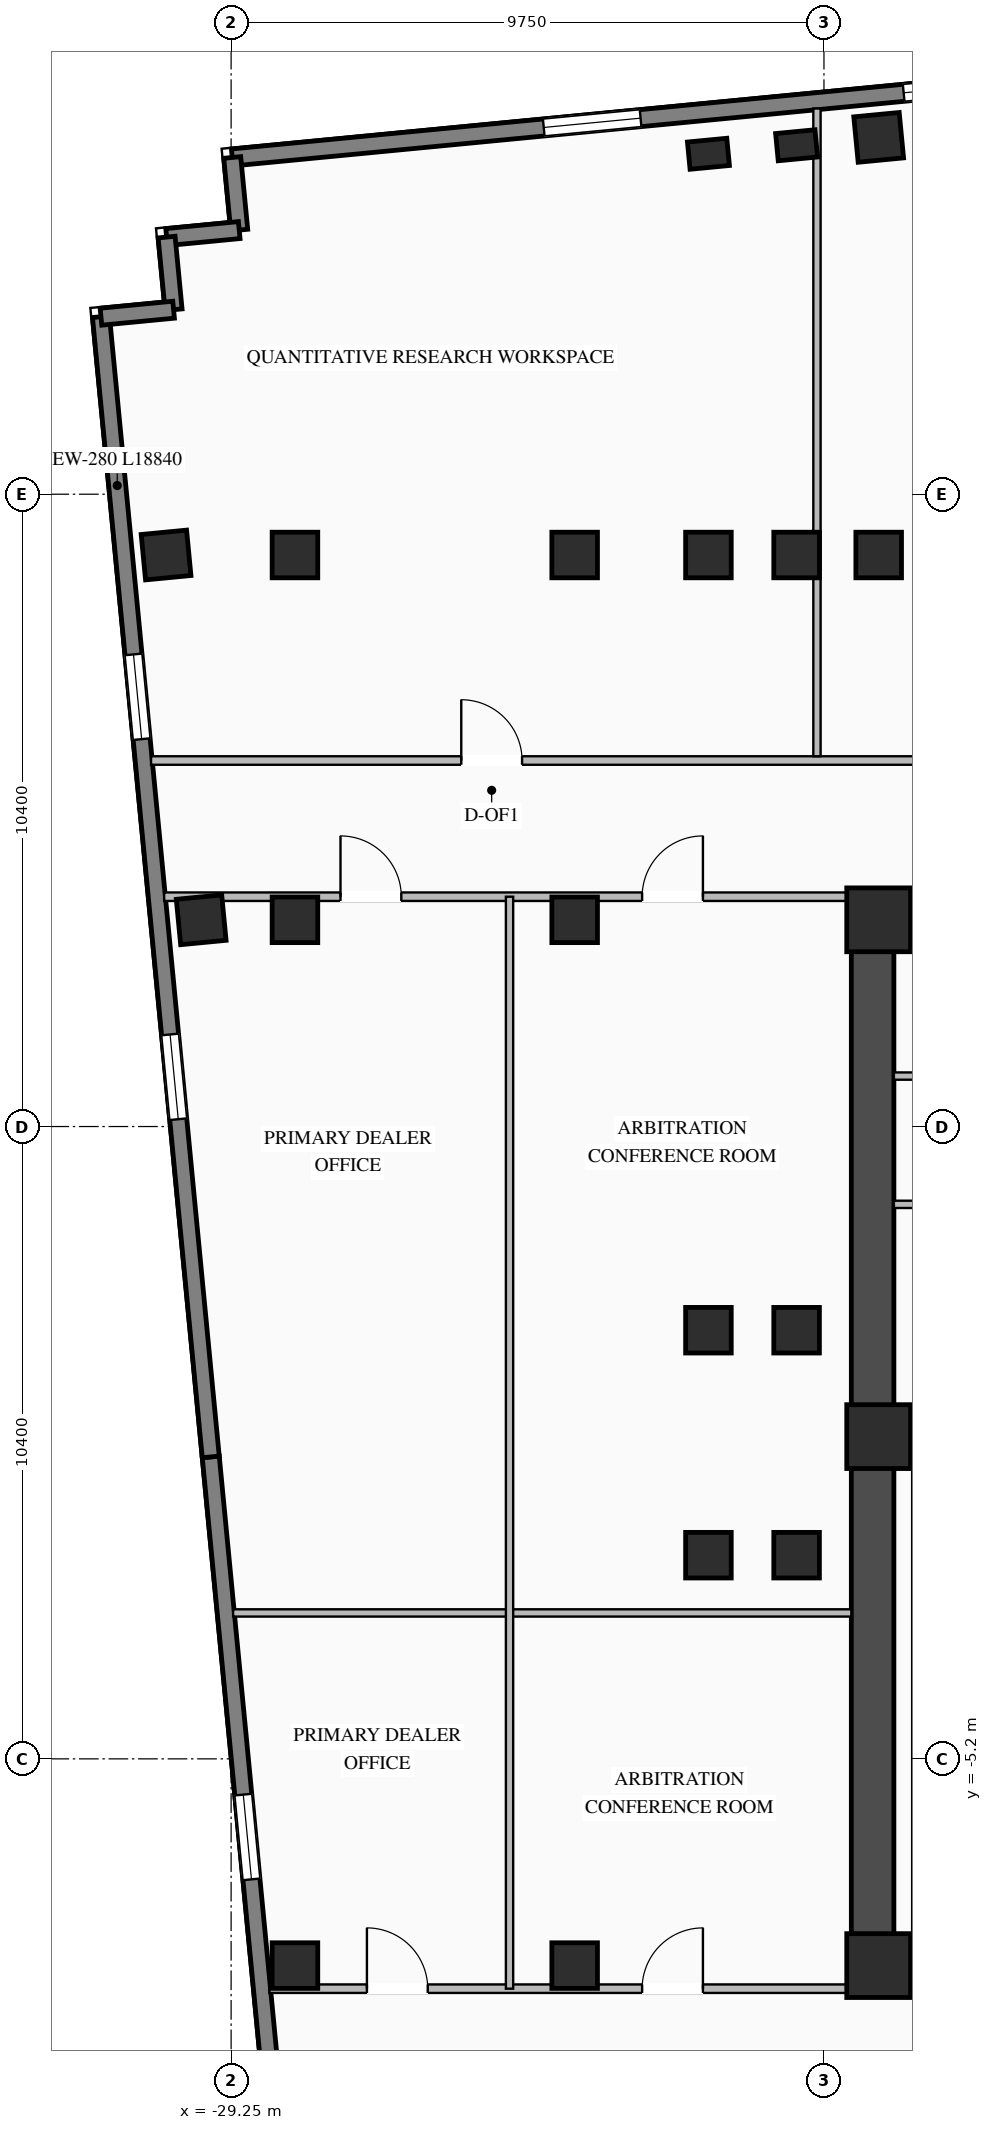
"""IFC4 building model, lengths in metres.
Left out: names, types, materials, properties, quantities, classifications, styles, units other than length and angle.
Written with IfcOpenShell. Run it as: python <this file> out.ifc"""

import sys

from ifc_helpers import new_model, si_unit, direction, frame, frame_2d, origin, origin_2d, place, context, subcontext, project, spatial, rectangle, i_section, extrude, element, fill, save


model = new_model("IFC4")
c1 = context("Model", 3, precision=1e-05, world=origin(), true_north=direction((0.0, 1.0)))
c2 = subcontext(c1, "Body", "Model", "MODEL_VIEW")
j1 = project(units=[si_unit("LENGTHUNIT", "METRE"), si_unit("PLANEANGLEUNIT", "RADIAN")], contexts=[c1])
p1 = place(None, origin())
s1 = spatial("IfcSite", under=j1, at=p1, CompositionType="ELEMENT")
p2 = place(p1, origin())
s2 = spatial("IfcBuilding", under=s1, at=p2, CompositionType="ELEMENT")
p3 = place(p2, frame((0.0, 0.0, 84.55)))
s3 = spatial("IfcBuildingStorey", under=s2, at=p3, CompositionType="ELEMENT", Elevation=84.55)
p4 = place(p3, frame((-19.05, -8.7, 0.0), z_axis=(0.0, 0.0, 1.0), x_axis=(1.0, 0.0, 0.0)))
e1 = element("IfcWall", 1, at=p4, inside=s3, PredefinedType="SHEAR", context=c2, shape_type="SweptSolid", body=[
    extrude(rectangle(XDim=10.25, YDim=0.7, at=frame_2d((5.125, 0.0))), origin(), (0.0, 0.0, 1.0), 3.27),
])
p5 = place(p3, frame((-19.05, 8.7, 0.0), z_axis=(0.0, 0.0, 1.0), x_axis=(1.0, 0.0, 0.0)))
e2 = element("IfcWall", 2, at=p5, inside=s3, PredefinedType="SHEAR", context=c2, shape_type="SweptSolid", body=[
    extrude(rectangle(XDim=10.25, YDim=0.7, at=frame_2d((5.125, 0.0))), origin(), (0.0, 0.0, 1.0), 3.27),
])
p6 = place(p5, frame((5.6, 0.0, 0.0)))
e3 = element("IfcOpeningElement", 3, at=p6, cuts=e2, PredefinedType="OPENING", context=c2, shape_type="SweptSolid", body=[
    extrude(rectangle(XDim=1.4, YDim=2.05, at=frame_2d((0.7, 1.025))), frame((0.0, 0.36, 0.0), z_axis=(0.0, -1.0, 0.0), x_axis=(1.0, 0.0, 0.0)), (0.0, 0.0, 1.0), 0.72),
])
p7 = place(p3, frame((-18.7, -8.35, 0.0), z_axis=(0.0, 0.0, 1.0), x_axis=(0.0, 1.0, 0.0)))
e4 = element("IfcWall", 4, at=p7, inside=s3, PredefinedType="SHEAR", context=c2, shape_type="SweptSolid", body=[
    extrude(rectangle(XDim=16.7, YDim=0.7, at=frame_2d((8.35, 0.0))), origin(), (0.0, 0.0, 1.0), 3.27),
])
for number, where, z_axis, x_axis in (
    (5, (-18.6, -8.6, 0.0), (0.0, 0.0, 1.0), (1.0, 0.0, 0.0)),
    (6, (-18.6, 0.1, 0.0), (0.0, 0.0, 1.0), (1.0, 0.0, 0.0)),
    (7, (-18.6, 8.6, 0.0), (0.0, 0.0, 1.0), (1.0, 0.0, 0.0)),
):
    element("IfcColumn", number, at=place(p3, frame(where, z_axis=z_axis, x_axis=x_axis)), inside=s3, PredefinedType="COLUMN", context=c2, shape_type="SweptSolid", body=[
        extrude(rectangle(XDim=1.05, YDim=1.05, at=origin_2d()), origin(), (0.0, 0.0, 1.0), 3.45),
    ])
for number, where, z_axis, x_axis in (
    (8, (-21.4, 14.6, 0.0), (0.0, 0.0, 1.0), (1.0, 0.0, 0.0)),
    (9, (-19.95, 14.6, 0.0), (0.0, 0.0, 1.0), (1.0, 0.0, 0.0)),
    (10, (-18.6, 14.6, 0.0), (0.0, 0.0, 1.0), (1.0, 0.0, 0.0)),
    (11, (-21.4, -1.85, 0.0), (0.0, 0.0, 1.0), (1.0, 0.0, 0.0)),
    (12, (-21.4, 1.85, 0.0), (0.0, 0.0, 1.0), (1.0, 0.0, 0.0)),
    (13, (-19.95, -1.85, 0.0), (0.0, 0.0, 1.0), (1.0, 0.0, 0.0)),
    (14, (-19.95, 1.85, 0.0), (0.0, 0.0, 1.0), (1.0, 0.0, 0.0)),
    (15, (-23.6, -8.6, 0.0), (0.0, 0.0, 1.0), (1.0, 0.0, 0.0)),
    (16, (-23.6, 8.6, 0.0), (0.0, 0.0, 1.0), (1.0, 0.0, 0.0)),
    (17, (-23.6, 14.6, 0.0), (0.0, 0.0, 1.0), (1.0, 0.0, 0.0)),
    (18, (-28.2, -8.6, 0.0), (0.0, 0.0, 1.0), (1.0, 0.0, 0.0)),
    (19, (-28.2, 8.6, 0.0), (0.0, 0.0, 1.0), (1.0, 0.0, 0.0)),
    (20, (-28.2, 14.6, 0.0), (0.0, 0.0, 1.0), (1.0, 0.0, 0.0)),
    (21, (-18.6, 21.469, 0.0), (0.0, 0.0, 1.0), (0.995, 0.096, 0.0)),
    (22, (-29.742, 8.6, 0.0), (0.0, 0.0, 1.0), (0.995, 0.096, 0.0)),
    (23, (-30.32, 14.6, 0.0), (0.0, 0.0, 1.0), (0.995, 0.096, 0.0)),
):
    element("IfcColumn", number, at=place(p3, frame(where, z_axis=z_axis, x_axis=x_axis)), inside=s3, PredefinedType="COLUMN", context=c2, shape_type="SweptSolid", body=[
        extrude(i_section(OverallWidth=0.75, OverallDepth=0.75, WebThickness=0.03, FlangeThickness=0.044, at=origin_2d()), origin(), (0.0, 0.0, 1.0), 3.45),
    ])
for number, where, z_axis, x_axis in (
    (24, (-21.4, 21.199, 0.0), (0.0, 0.0, 1.0), (0.995, 0.096, 0.0)),
    (25, (-19.95, 21.339, 0.0), (0.0, 0.0, 1.0), (0.995, 0.096, 0.0)),
):
    element("IfcColumn", number, at=place(p3, frame(where, z_axis=z_axis, x_axis=x_axis)), inside=s3, PredefinedType="PILASTER", context=c2, shape_type="SweptSolid", body=[
        extrude(rectangle(XDim=0.65, YDim=0.45, at=origin_2d()), origin(), (0.0, 0.0, 1.0), 3.45),
    ])
p8 = place(p3, frame((-29.231, 21.138, 0.0), z_axis=(0.0, 0.0, 1.0), x_axis=(0.995395780835, 0.095850088663, 0.0)))
e26 = element("IfcWall", 26, at=p8, inside=s3, PredefinedType="STANDARD", context=c2, shape_type="SweptSolid", body=[
    extrude(rectangle(XDim=17.84, YDim=0.28, at=frame_2d((8.92, 0.0))), origin(), (0.0, 0.0, 1.0), 3.25),
])
p9 = place(p8, frame((5.147, 0.0, 0.76)))
e27 = element("IfcOpeningElement", 27, at=p9, cuts=e26, PredefinedType="OPENING", context=c2, shape_type="SweptSolid", body=[
    extrude(rectangle(XDim=1.6, YDim=1.95, at=frame_2d((0.8, 0.975))), frame((0.0, 0.15, 0.0), z_axis=(0.0, -1.0, 0.0), x_axis=(1.0, 0.0, 0.0)), (0.0, 0.0, 1.0), 0.3),
])
p10 = place(p8, frame((11.093, 0.0, 0.76)))
e28 = element("IfcOpeningElement", 28, at=p10, cuts=e26, PredefinedType="OPENING", context=c2, shape_type="SweptSolid", body=[
    extrude(rectangle(XDim=1.6, YDim=1.95, at=frame_2d((0.8, 0.975))), frame((0.0, 0.15, 0.0), z_axis=(0.0, -1.0, 0.0), x_axis=(1.0, 0.0, 0.0)), (0.0, 0.0, 1.0), 0.3),
])
p11 = place(p3, frame((-27.779, -18.987, 0.0), z_axis=(0.0, 0.0, 1.0), x_axis=(-0.095842534142, 0.995396508256, 0.0)))
e29 = element("IfcWall", 29, at=p11, inside=s3, PredefinedType="STANDARD", context=c2, shape_type="SweptSolid", body=[
    extrude(rectangle(XDim=18.84, YDim=0.28, at=frame_2d((9.42, 0.0))), origin(), (0.0, 0.0, 1.0), 3.25),
])
p12 = place(p11, frame((5.58, 0.0, 0.76)))
e30 = element("IfcOpeningElement", 30, at=p12, cuts=e29, PredefinedType="OPENING", context=c2, shape_type="SweptSolid", body=[
    extrude(rectangle(XDim=1.4, YDim=1.95, at=frame_2d((0.7, 0.975))), frame((0.0, 0.15, 0.0), z_axis=(0.0, -1.0, 0.0), x_axis=(1.0, 0.0, 0.0)), (0.0, 0.0, 1.0), 0.3),
])
p13 = place(p11, frame((11.86, 0.0, 0.76)))
e31 = element("IfcOpeningElement", 31, at=p13, cuts=e29, PredefinedType="OPENING", context=c2, shape_type="SweptSolid", body=[
    extrude(rectangle(XDim=1.4, YDim=1.95, at=frame_2d((0.7, 0.975))), frame((0.0, 0.15, 0.0), z_axis=(0.0, -1.0, 0.0), x_axis=(1.0, 0.0, 0.0)), (0.0, 0.0, 1.0), 0.3),
])
p14 = place(p3, frame((-29.585, -0.234, 0.0), z_axis=(0.0, 0.0, 1.0), x_axis=(-0.095841297881, 0.99539662729, 0.0)))
e32 = element("IfcWall", 32, at=p14, inside=s3, PredefinedType="STANDARD", context=c2, shape_type="SweptSolid", body=[
    extrude(rectangle(XDim=18.84, YDim=0.28, at=frame_2d((9.42, 0.0))), origin(), (0.0, 0.0, 1.0), 3.25),
])
p15 = place(p14, frame((5.58, 0.0, 0.76)))
e33 = element("IfcOpeningElement", 33, at=p15, cuts=e32, PredefinedType="OPENING", context=c2, shape_type="SweptSolid", body=[
    extrude(rectangle(XDim=1.4, YDim=1.95, at=frame_2d((0.7, 0.975))), frame((0.0, 0.15, 0.0), z_axis=(0.0, -1.0, 0.0), x_axis=(1.0, 0.0, 0.0)), (0.0, 0.0, 1.0), 0.3),
])
p16 = place(p14, frame((11.86, 0.0, 0.76)))
e34 = element("IfcOpeningElement", 34, at=p16, cuts=e32, PredefinedType="OPENING", context=c2, shape_type="SweptSolid", body=[
    extrude(rectangle(XDim=1.4, YDim=1.95, at=frame_2d((0.7, 0.975))), frame((0.0, 0.15, 0.0), z_axis=(0.0, -1.0, 0.0), x_axis=(1.0, 0.0, 0.0)), (0.0, 0.0, 1.0), 0.3),
])
for number, where, z_axis, x_axis in (
    (35, (-29.231, 21.138, 0.0), (0.0, 0.0, 1.0), (0.096, -0.995, 0.0)),
    (36, (-29.116, 19.944, 0.0), (0.0, 0.0, 1.0), (-0.995, -0.096, 0.0)),
):
    element("IfcWall", number, at=place(p3, frame(where, z_axis=z_axis, x_axis=x_axis)), inside=s3, PredefinedType="STANDARD", context=c2, shape_type="SweptSolid", body=[
        extrude(rectangle(XDim=1.2, YDim=0.28, at=frame_2d((0.6, 0.0))), origin(), (0.0, 0.0, 1.0), 3.25),
    ])
for number, where, z_axis, x_axis in (
    (37, (-30.311, 19.829, 0.0), (0.0, 0.0, 1.0), (0.096, -0.995, 0.0)),
    (38, (-30.196, 18.635, 0.0), (0.0, 0.0, 1.0), (-0.995, -0.096, 0.0)),
):
    element("IfcWall", number, at=place(p3, frame(where, z_axis=z_axis, x_axis=x_axis)), inside=s3, PredefinedType="STANDARD", context=c2, shape_type="SweptSolid", body=[
        extrude(rectangle(XDim=1.2, YDim=0.28, at=frame_2d((0.6, 0.0))), origin(), (0.0, 0.0, 1.0), 3.25),
    ])
p17 = place(p3, frame((-18.35, 3.92, 0.0), z_axis=(0.0, 0.0, 1.0), x_axis=(1.0, 0.0, 0.0)))
e39 = element("IfcWall", 39, at=p17, inside=s3, PredefinedType="STANDARD", context=c2, shape_type="SweptSolid", body=[
    extrude(rectangle(XDim=4.45, YDim=0.12, at=frame_2d((2.225, 0.0))), origin(), (0.0, 0.0, 1.0), 3.25),
])
p18 = place(p3, frame((-18.35, 6.03, 0.0), z_axis=(0.0, 0.0, 1.0), x_axis=(1.0, 0.0, 0.0)))
e40 = element("IfcWall", 40, at=p18, inside=s3, PredefinedType="STANDARD", context=c2, shape_type="SweptSolid", body=[
    extrude(rectangle(XDim=2.2, YDim=0.12, at=frame_2d((1.1, 0.0))), origin(), (0.0, 0.0, 1.0), 3.25),
])
p19 = place(p3, frame((-30.567, 11.22, 0.0), z_axis=(0.0, 0.0, 1.0), x_axis=(1.0, 0.0, 0.0)))
e41 = element("IfcWall", 41, at=p19, inside=s3, PredefinedType="STANDARD", context=c2, shape_type="SweptSolid", body=[
    extrude(rectangle(XDim=67.551, YDim=0.14, at=frame_2d((33.775, 0.0))), origin(), (0.0, 0.0, 1.0), 3.25),
])
p20 = place(p19, frame((5.102, 0.0, 0.0)))
e42 = element("IfcOpeningElement", 42, at=p20, cuts=e41, PredefinedType="OPENING", context=c2, shape_type="SweptSolid", body=[
    extrude(rectangle(XDim=1.0, YDim=2.08, at=frame_2d((0.5, 1.04))), frame((0.0, 0.08, 0.0), z_axis=(0.0, -1.0, 0.0), x_axis=(1.0, 0.0, 0.0)), (0.0, 0.0, 1.0), 0.16),
])
p21 = place(p19, frame((17.263, 0.0, 0.0)))
e43 = element("IfcOpeningElement", 43, at=p21, cuts=e41, PredefinedType="OPENING", context=c2, shape_type="SweptSolid", body=[
    extrude(rectangle(XDim=1.0, YDim=2.08, at=frame_2d((0.5, 1.04))), frame((0.0, 0.08, 0.0), z_axis=(0.0, -1.0, 0.0), x_axis=(1.0, 0.0, 0.0)), (0.0, 0.0, 1.0), 0.16),
])
p22 = place(p19, frame((31.566, 0.0, 0.0)))
e44 = element("IfcOpeningElement", 44, at=p22, cuts=e41, PredefinedType="OPENING", context=c2, shape_type="SweptSolid", body=[
    extrude(rectangle(XDim=1.0, YDim=2.08, at=frame_2d((0.5, 1.04))), frame((0.0, 0.08, 0.0), z_axis=(0.0, -1.0, 0.0), x_axis=(1.0, 0.0, 0.0)), (0.0, 0.0, 1.0), 0.16),
])
p23 = place(p19, frame((46.551, 0.0, 0.0)))
e45 = element("IfcOpeningElement", 45, at=p23, cuts=e41, PredefinedType="OPENING", context=c2, shape_type="SweptSolid", body=[
    extrude(rectangle(XDim=1.0, YDim=2.08, at=frame_2d((0.5, 1.04))), frame((0.0, 0.08, 0.0), z_axis=(0.0, -1.0, 0.0), x_axis=(1.0, 0.0, 0.0)), (0.0, 0.0, 1.0), 0.16),
])
p24 = place(p19, frame((60.421, 0.0, 0.0)))
e46 = element("IfcOpeningElement", 46, at=p24, cuts=e41, PredefinedType="OPENING", context=c2, shape_type="SweptSolid", body=[
    extrude(rectangle(XDim=1.0, YDim=2.08, at=frame_2d((0.5, 1.04))), frame((0.0, 0.08, 0.0), z_axis=(0.0, -1.0, 0.0), x_axis=(1.0, 0.0, 0.0)), (0.0, 0.0, 1.0), 0.16),
])
p25 = place(p3, frame((-19.615, 11.29, 0.0), z_axis=(0.0, 0.0, 1.0), x_axis=(0.0, 1.0, 0.0)))
e47 = element("IfcWall", 47, at=p25, inside=s3, PredefinedType="STANDARD", context=c2, shape_type="SweptSolid", body=[
    extrude(rectangle(XDim=10.654, YDim=0.12, at=frame_2d((5.327, 0.0))), origin(), (0.0, 0.0, 1.0), 3.25),
])
p26 = place(p3, frame((-30.351, 8.98, 0.0), z_axis=(0.0, 0.0, 1.0), x_axis=(1.0, 0.0, 0.0)))
e48 = element("IfcWall", 48, at=p26, inside=s3, PredefinedType="STANDARD", context=c2, shape_type="SweptSolid", body=[
    extrude(rectangle(XDim=11.301, YDim=0.14, at=frame_2d((5.651, 0.0))), origin(), (0.0, 0.0, 1.0), 3.25),
])
p27 = place(p26, frame((2.9, 0.0, 0.0)))
e49 = element("IfcOpeningElement", 49, at=p27, cuts=e48, PredefinedType="OPENING", context=c2, shape_type="SweptSolid", body=[
    extrude(rectangle(XDim=1.0, YDim=2.08, at=frame_2d((0.5, 1.04))), frame((0.0, 0.08, 0.0), z_axis=(0.0, -1.0, 0.0), x_axis=(1.0, 0.0, 0.0)), (0.0, 0.0, 1.0), 0.16),
])
p28 = place(p26, frame((7.861, 0.0, 0.0)))
e50 = element("IfcOpeningElement", 50, at=p28, cuts=e48, PredefinedType="OPENING", context=c2, shape_type="SweptSolid", body=[
    extrude(rectangle(XDim=1.0, YDim=2.08, at=frame_2d((0.5, 1.04))), frame((0.0, 0.08, 0.0), z_axis=(0.0, -1.0, 0.0), x_axis=(1.0, 0.0, 0.0)), (0.0, 0.0, 1.0), 0.16),
])
p29 = place(p3, frame((-28.622, -8.98, 0.0), z_axis=(0.0, 0.0, 1.0), x_axis=(1.0, 0.0, 0.0)))
e51 = element("IfcWall", 51, at=p29, inside=s3, PredefinedType="STANDARD", context=c2, shape_type="SweptSolid", body=[
    extrude(rectangle(XDim=9.572, YDim=0.14, at=frame_2d((4.786, 0.0))), origin(), (0.0, 0.0, 1.0), 3.25),
])
p30 = place(p29, frame((1.605, 0.0, 0.0)))
e52 = element("IfcOpeningElement", 52, at=p30, cuts=e51, PredefinedType="OPENING", context=c2, shape_type="SweptSolid", body=[
    extrude(rectangle(XDim=1.0, YDim=2.08, at=frame_2d((0.5, 1.04))), frame((0.0, 0.08, 0.0), z_axis=(0.0, -1.0, 0.0), x_axis=(1.0, 0.0, 0.0)), (0.0, 0.0, 1.0), 0.16),
])
p31 = place(p29, frame((6.132, 0.0, 0.0)))
e53 = element("IfcOpeningElement", 53, at=p31, cuts=e51, PredefinedType="OPENING", context=c2, shape_type="SweptSolid", body=[
    extrude(rectangle(XDim=1.0, YDim=2.08, at=frame_2d((0.5, 1.04))), frame((0.0, 0.08, 0.0), z_axis=(0.0, -1.0, 0.0), x_axis=(1.0, 0.0, 0.0)), (0.0, 0.0, 1.0), 0.16),
])
p32 = place(p3, frame((-29.217, -2.8, 0.0), z_axis=(0.0, 0.0, 1.0), x_axis=(1.0, 0.0, 0.0)))
e54 = element("IfcWall", 54, at=p32, inside=s3, PredefinedType="STANDARD", context=c2, shape_type="SweptSolid", body=[
    extrude(rectangle(XDim=10.167, YDim=0.12, at=frame_2d((5.083, 0.0))), origin(), (0.0, 0.0, 1.0), 3.25),
])
p33 = place(p3, frame((-24.671, -8.98, 0.0), z_axis=(0.0, 0.0, 1.0), x_axis=(0.0, 1.0, 0.0)))
e55 = element("IfcWall", 55, at=p33, inside=s3, PredefinedType="STANDARD", context=c2, shape_type="SweptSolid", body=[
    extrude(rectangle(XDim=17.96, YDim=0.12, at=frame_2d((8.98, 0.0))), origin(), (0.0, 0.0, 1.0), 3.25),
])
p34 = place(p9, origin())
e56 = element("IfcWindow", 56, at=p34, inside=s3, PartitioningType="SINGLE_PANEL", PredefinedType="WINDOW", context=c2, shape_type="SweptSolid", body=[
    extrude(rectangle(XDim=1.6, YDim=1.95, at=frame_2d((0.8, 0.975))), frame((0.0, 0.03, 0.0), z_axis=(0.0, -1.0, 0.0), x_axis=(1.0, 0.0, 0.0)), (0.0, 0.0, 1.0), 0.06),
])
fill(e27, e56)
p35 = place(p10, origin())
e57 = element("IfcWindow", 57, at=p35, inside=s3, PartitioningType="SINGLE_PANEL", PredefinedType="WINDOW", context=c2, shape_type="SweptSolid", body=[
    extrude(rectangle(XDim=1.6, YDim=1.95, at=frame_2d((0.8, 0.975))), frame((0.0, 0.03, 0.0), z_axis=(0.0, -1.0, 0.0), x_axis=(1.0, 0.0, 0.0)), (0.0, 0.0, 1.0), 0.06),
])
fill(e28, e57)
p36 = place(p13, origin())
e58 = element("IfcWindow", 58, at=p36, inside=s3, PartitioningType="SINGLE_PANEL", PredefinedType="WINDOW", context=c2, shape_type="SweptSolid", body=[
    extrude(rectangle(XDim=1.4, YDim=1.95, at=frame_2d((0.7, 0.975))), frame((0.0, 0.03, 0.0), z_axis=(0.0, -1.0, 0.0), x_axis=(1.0, 0.0, 0.0)), (0.0, 0.0, 1.0), 0.06),
])
fill(e31, e58)
p37 = place(p15, origin())
e59 = element("IfcWindow", 59, at=p37, inside=s3, PartitioningType="SINGLE_PANEL", PredefinedType="WINDOW", context=c2, shape_type="SweptSolid", body=[
    extrude(rectangle(XDim=1.4, YDim=1.95, at=frame_2d((0.7, 0.975))), frame((0.0, 0.03, 0.0), z_axis=(0.0, -1.0, 0.0), x_axis=(1.0, 0.0, 0.0)), (0.0, 0.0, 1.0), 0.06),
])
fill(e33, e59)
p38 = place(p16, origin())
e60 = element("IfcWindow", 60, at=p38, inside=s3, PartitioningType="SINGLE_PANEL", PredefinedType="WINDOW", context=c2, shape_type="SweptSolid", body=[
    extrude(rectangle(XDim=1.4, YDim=1.95, at=frame_2d((0.7, 0.975))), frame((0.0, 0.03, 0.0), z_axis=(0.0, -1.0, 0.0), x_axis=(1.0, 0.0, 0.0)), (0.0, 0.0, 1.0), 0.06),
])
fill(e34, e60)
p39 = place(p20, origin())
e61 = element("IfcDoor", 61, at=p39, inside=s3, OperationType="SINGLE_SWING_LEFT", PredefinedType="DOOR", context=c2, shape_type="SweptSolid", body=[
    extrude(rectangle(XDim=1.0, YDim=2.08, at=frame_2d((0.5, 1.04))), frame((0.0, 0.025, 0.0), z_axis=(0.0, -1.0, 0.0), x_axis=(1.0, 0.0, 0.0)), (0.0, 0.0, 1.0), 0.05),
])
fill(e42, e61)
p40 = place(p27, origin())
e62 = element("IfcDoor", 62, at=p40, inside=s3, OperationType="SINGLE_SWING_LEFT", PredefinedType="DOOR", context=c2, shape_type="SweptSolid", body=[
    extrude(rectangle(XDim=1.0, YDim=2.08, at=frame_2d((0.5, 1.04))), frame((0.0, 0.025, 0.0), z_axis=(0.0, -1.0, 0.0), x_axis=(1.0, 0.0, 0.0)), (0.0, 0.0, 1.0), 0.05),
])
fill(e49, e62)
p41 = place(p28, origin())
e63 = element("IfcDoor", 63, at=p41, inside=s3, OperationType="SINGLE_SWING_RIGHT", PredefinedType="DOOR", context=c2, shape_type="SweptSolid", body=[
    extrude(rectangle(XDim=1.0, YDim=2.08, at=frame_2d((0.5, 1.04))), frame((0.0, 0.025, 0.0), z_axis=(0.0, -1.0, 0.0), x_axis=(1.0, 0.0, 0.0)), (0.0, 0.0, 1.0), 0.05),
])
fill(e50, e63)
p42 = place(p30, origin())
e64 = element("IfcDoor", 64, at=p42, inside=s3, OperationType="SINGLE_SWING_LEFT", PredefinedType="DOOR", context=c2, shape_type="SweptSolid", body=[
    extrude(rectangle(XDim=1.0, YDim=2.08, at=frame_2d((0.5, 1.04))), frame((0.0, 0.025, 0.0), z_axis=(0.0, -1.0, 0.0), x_axis=(1.0, 0.0, 0.0)), (0.0, 0.0, 1.0), 0.05),
])
fill(e52, e64)
p43 = place(p31, origin())
e65 = element("IfcDoor", 65, at=p43, inside=s3, OperationType="SINGLE_SWING_RIGHT", PredefinedType="DOOR", context=c2, shape_type="SweptSolid", body=[
    extrude(rectangle(XDim=1.0, YDim=2.08, at=frame_2d((0.5, 1.04))), frame((0.0, 0.025, 0.0), z_axis=(0.0, -1.0, 0.0), x_axis=(1.0, 0.0, 0.0)), (0.0, 0.0, 1.0), 0.05),
])
fill(e53, e65)
save(model, sys.argv[1])
